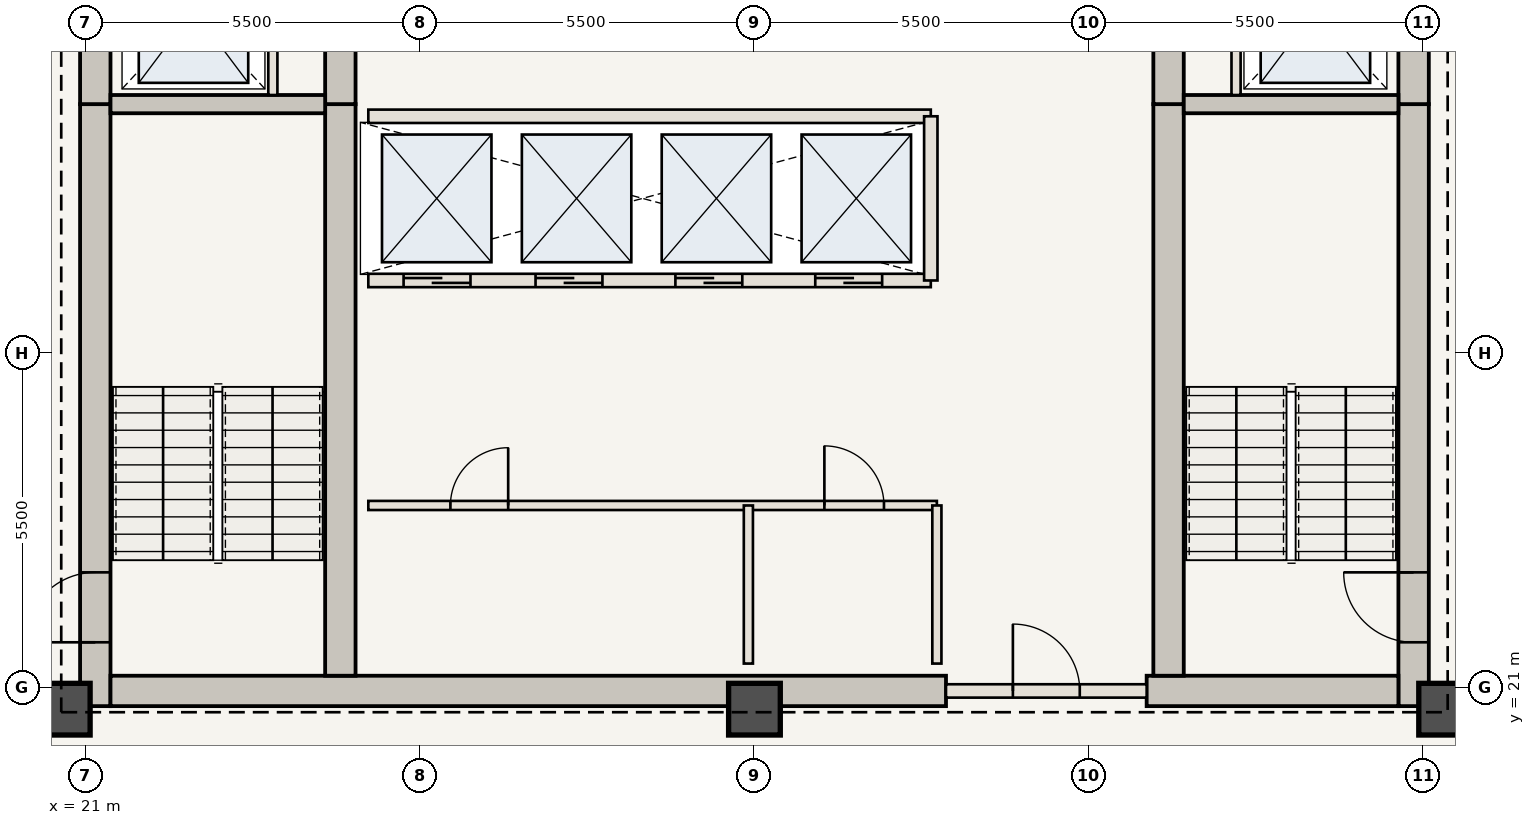
"""IFC4 building model, lengths in metres.
Left out: names, types, materials, properties, quantities, classifications, styles, units other than length and angle.
Written with IfcOpenShell. Run it as: python <this file> out.ifc"""

import sys

from ifc_helpers import new_model, si_unit, direction, frame, frame_2d, origin, origin_2d, place, context, subcontext, project, spatial, rectangle, extrude, element, fill, save


model = new_model("IFC4")
c1 = context("Model", 3, precision=1e-05, world=origin(), true_north=direction((0.0, 1.0)))
c2 = subcontext(c1, "Body", "Model", "MODEL_VIEW")
j1 = project(units=[si_unit("LENGTHUNIT", "METRE"), si_unit("PLANEANGLEUNIT", "RADIAN")], contexts=[c1])
p1 = place(None, origin())
s1 = spatial("IfcSite", under=j1, at=p1, CompositionType="ELEMENT")
p2 = place(p1, origin())
s2 = spatial("IfcBuilding", under=s1, at=p2, CompositionType="ELEMENT")
p3 = place(p2, frame((0.0, 0.0, 217.7)))
s3 = spatial("IfcBuildingStorey", under=s2, at=p3, CompositionType="ELEMENT", Elevation=217.7)
p4 = place(p3, frame((21.16, 20.7, 0.0), z_axis=(0.0, 0.0, 1.0), x_axis=(0.0, 1.0, 0.0)))
e1 = element("IfcWall", 1, at=p4, inside=s3, PredefinedType="SHEAR", context=c2, shape_type="SweptSolid", body=[
    extrude(rectangle(XDim=9.9, YDim=0.5, at=frame_2d((4.95, 0.0))), origin(), (0.0, 0.0, 1.0), 3.85),
])
p5 = place(p4, frame((1.05, 0.0, 0.0)))
e2 = element("IfcOpeningElement", 2, at=p5, cuts=e1, PredefinedType="OPENING", context=c2, shape_type="SweptSolid", body=[
    extrude(rectangle(XDim=1.15, YDim=2.15, at=frame_2d((0.575, 1.075))), frame((0.0, 0.26, 0.0), z_axis=(0.0, -1.0, 0.0), x_axis=(1.0, 0.0, 0.0)), (0.0, 0.0, 1.0), 0.52),
])
p6 = place(p3, frame((21.16, 30.6, 0.0), z_axis=(0.0, 0.0, 1.0), x_axis=(0.0, 1.0, 0.0)))
e3 = element("IfcWall", 3, at=p6, inside=s3, PredefinedType="SHEAR", context=c2, shape_type="SweptSolid", body=[
    extrude(rectangle(XDim=12.65, YDim=0.5, at=frame_2d((6.325, 0.0))), origin(), (0.0, 0.0, 1.0), 3.85),
])
p7 = place(p6, frame((4.2, 0.0, 0.0)))
e4 = element("IfcOpeningElement", 4, at=p7, cuts=e3, PredefinedType="OPENING", context=c2, shape_type="SweptSolid", body=[
    extrude(rectangle(XDim=1.1, YDim=2.15, at=frame_2d((0.55, 1.075))), frame((0.0, 0.26, 0.0), z_axis=(0.0, -1.0, 0.0), x_axis=(1.0, 0.0, 0.0)), (0.0, 0.0, 1.0), 0.52),
])
p8 = place(p6, frame((8.05, 0.0, 0.0)))
e5 = element("IfcOpeningElement", 5, at=p8, cuts=e3, PredefinedType="OPENING", context=c2, shape_type="SweptSolid", body=[
    extrude(rectangle(XDim=0.92, YDim=2.1, at=frame_2d((0.46, 1.05))), frame((0.0, 0.26, 0.0), z_axis=(0.0, -1.0, 0.0), x_axis=(1.0, 0.0, 0.0)), (0.0, 0.0, 1.0), 0.52),
])
p9 = place(p6, frame((9.45, 0.0, 0.0)))
e6 = element("IfcOpeningElement", 6, at=p9, cuts=e3, PredefinedType="OPENING", context=c2, shape_type="SweptSolid", body=[
    extrude(rectangle(XDim=0.88, YDim=2.1, at=frame_2d((0.44, 1.05))), frame((0.0, 0.26, 0.0), z_axis=(0.0, -1.0, 0.0), x_axis=(1.0, 0.0, 0.0)), (0.0, 0.0, 1.0), 0.52),
])
p10 = place(p6, frame((10.85, 0.0, 0.0)))
e7 = element("IfcOpeningElement", 7, at=p10, cuts=e3, PredefinedType="OPENING", context=c2, shape_type="SweptSolid", body=[
    extrude(rectangle(XDim=0.88, YDim=2.1, at=frame_2d((0.44, 1.05))), frame((0.0, 0.26, 0.0), z_axis=(0.0, -1.0, 0.0), x_axis=(1.0, 0.0, 0.0)), (0.0, 0.0, 1.0), 0.52),
])
p11 = place(p3, frame((42.84, 20.7, 0.0), z_axis=(0.0, 0.0, 1.0), x_axis=(0.0, 1.0, 0.0)))
e8 = element("IfcWall", 8, at=p11, inside=s3, PredefinedType="SHEAR", context=c2, shape_type="SweptSolid", body=[
    extrude(rectangle(XDim=9.9, YDim=0.5, at=frame_2d((4.95, 0.0))), origin(), (0.0, 0.0, 1.0), 3.85),
])
p12 = place(p11, frame((1.05, 0.0, 0.0)))
e9 = element("IfcOpeningElement", 9, at=p12, cuts=e8, PredefinedType="OPENING", context=c2, shape_type="SweptSolid", body=[
    extrude(rectangle(XDim=1.15, YDim=2.15, at=frame_2d((0.575, 1.075))), frame((0.0, 0.26, 0.0), z_axis=(0.0, -1.0, 0.0), x_axis=(1.0, 0.0, 0.0)), (0.0, 0.0, 1.0), 0.52),
])
p13 = place(p3, frame((42.84, 30.6, 0.0), z_axis=(0.0, 0.0, 1.0), x_axis=(0.0, 1.0, 0.0)))
e10 = element("IfcWall", 10, at=p13, inside=s3, PredefinedType="SHEAR", context=c2, shape_type="SweptSolid", body=[
    extrude(rectangle(XDim=12.65, YDim=0.5, at=frame_2d((6.325, 0.0))), origin(), (0.0, 0.0, 1.0), 3.85),
])
p14 = place(p13, frame((4.2, 0.0, 0.0)))
e11 = element("IfcOpeningElement", 11, at=p14, cuts=e10, PredefinedType="OPENING", context=c2, shape_type="SweptSolid", body=[
    extrude(rectangle(XDim=1.1, YDim=2.15, at=frame_2d((0.55, 1.075))), frame((0.0, 0.26, 0.0), z_axis=(0.0, -1.0, 0.0), x_axis=(1.0, 0.0, 0.0)), (0.0, 0.0, 1.0), 0.52),
])
p15 = place(p13, frame((9.2, 0.0, 0.0)))
e12 = element("IfcOpeningElement", 12, at=p15, cuts=e10, PredefinedType="OPENING", context=c2, shape_type="SweptSolid", body=[
    extrude(rectangle(XDim=0.92, YDim=2.1, at=frame_2d((0.46, 1.05))), frame((0.0, 0.26, 0.0), z_axis=(0.0, -1.0, 0.0), x_axis=(1.0, 0.0, 0.0)), (0.0, 0.0, 1.0), 0.52),
])
p16 = place(p3, frame((21.41, 20.95, 0.0), z_axis=(0.0, 0.0, 1.0), x_axis=(1.0, 0.0, 0.0)))
e13 = element("IfcWall", 13, at=p16, inside=s3, PredefinedType="SHEAR", context=c2, shape_type="SweptSolid", body=[
    extrude(rectangle(XDim=13.74, YDim=0.5, at=frame_2d((6.87, 0.0))), origin(), (0.0, 0.0, 1.0), 3.85),
])
p17 = place(p3, frame((38.45, 20.95, 0.0), z_axis=(0.0, 0.0, 1.0), x_axis=(1.0, 0.0, 0.0)))
e14 = element("IfcWall", 14, at=p17, inside=s3, PredefinedType="SHEAR", context=c2, shape_type="SweptSolid", body=[
    extrude(rectangle(XDim=4.14, YDim=0.5, at=frame_2d((2.07, 0.0))), origin(), (0.0, 0.0, 1.0), 3.85),
])
p18 = place(p3, frame((25.19, 21.2, 0.0), z_axis=(0.0, 0.0, 1.0), x_axis=(0.0, 1.0, 0.0)))
e15 = element("IfcWall", 15, at=p18, inside=s3, PredefinedType="SHEAR", context=c2, shape_type="SweptSolid", body=[
    extrude(rectangle(XDim=9.4, YDim=0.5, at=frame_2d((4.7, 0.0))), origin(), (0.0, 0.0, 1.0), 3.85),
])
p19 = place(p3, frame((25.19, 30.6, 0.0), z_axis=(0.0, 0.0, 1.0), x_axis=(0.0, 1.0, 0.0)))
e16 = element("IfcWall", 16, at=p19, inside=s3, PredefinedType="SHEAR", context=c2, shape_type="SweptSolid", body=[
    extrude(rectangle(XDim=12.15, YDim=0.5, at=frame_2d((6.075, 0.0))), origin(), (0.0, 0.0, 1.0), 3.85),
])
p20 = place(p19, frame((6.25, 0.0, 0.0)))
e17 = element("IfcOpeningElement", 17, at=p20, cuts=e16, PredefinedType="OPENING", context=c2, shape_type="SweptSolid", body=[
    extrude(rectangle(XDim=1.1, YDim=2.15, at=frame_2d((0.55, 1.075))), frame((0.0, 0.26, 0.0), z_axis=(0.0, -1.0, 0.0), x_axis=(1.0, 0.0, 0.0)), (0.0, 0.0, 1.0), 0.52),
])
p21 = place(p3, frame((38.81, 21.2, 0.0), z_axis=(0.0, 0.0, 1.0), x_axis=(0.0, 1.0, 0.0)))
e18 = element("IfcWall", 18, at=p21, inside=s3, PredefinedType="SHEAR", context=c2, shape_type="SweptSolid", body=[
    extrude(rectangle(XDim=9.4, YDim=0.5, at=frame_2d((4.7, 0.0))), origin(), (0.0, 0.0, 1.0), 3.85),
])
p22 = place(p3, frame((38.81, 30.6, 0.0), z_axis=(0.0, 0.0, 1.0), x_axis=(0.0, 1.0, 0.0)))
e19 = element("IfcWall", 19, at=p22, inside=s3, PredefinedType="SHEAR", context=c2, shape_type="SweptSolid", body=[
    extrude(rectangle(XDim=12.15, YDim=0.5, at=frame_2d((6.075, 0.0))), origin(), (0.0, 0.0, 1.0), 3.85),
])
for number, where, z_axis, x_axis in (
    (20, (20.65, 20.65, 0.0), (0.0, 0.0, 1.0), (1.0, 0.0, 0.0)),
    (21, (32.0, 20.65, 0.0), (0.0, 0.0, 1.0), (1.0, 0.0, 0.0)),
    (22, (43.35, 20.65, 0.0), (0.0, 0.0, 1.0), (1.0, 0.0, 0.0)),
):
    element("IfcColumn", number, at=place(p3, frame(where, z_axis=z_axis, x_axis=x_axis)), inside=s3, PredefinedType="COLUMN", context=c2, shape_type="SweptSolid", body=[
        extrude(rectangle(XDim=0.85, YDim=0.85, at=origin_2d()), origin(), (0.0, 0.0, 1.0), 3.85),
    ])
for number, where, z_axis, x_axis in (
    (23, (21.41, 30.6, 0.0), (0.0, 0.0, 1.0), (1.0, 0.0, 0.0)),
    (24, (39.06, 30.6, 0.0), (0.0, 0.0, 1.0), (1.0, 0.0, 0.0)),
):
    element("IfcWall", number, at=place(p3, frame(where, z_axis=z_axis, x_axis=x_axis)), inside=s3, PredefinedType="SHEAR", context=c2, shape_type="SweptSolid", body=[
        extrude(rectangle(XDim=3.53, YDim=0.3, at=frame_2d((1.765, 0.0))), origin(), (0.0, 0.0, 1.0), 3.685),
    ])
for number, where, z_axis, x_axis in (
    (25, (24.08, 30.75, 0.0), (0.0, 0.0, 1.0), (0.0, 1.0, 0.0)),
    (26, (39.92, 30.75, 0.0), (0.0, 0.0, 1.0), (0.0, 1.0, 0.0)),
):
    element("IfcWall", number, at=place(p3, frame(where, z_axis=z_axis, x_axis=x_axis)), inside=s3, PredefinedType="STANDARD", context=c2, shape_type="SweptSolid", body=[
        extrude(rectangle(XDim=2.65, YDim=0.15, at=frame_2d((1.325, 0.0))), origin(), (0.0, 0.0, 1.0), 3.685),
    ])
p23 = place(p3, frame((35.15, 20.95, 0.0), z_axis=(0.0, 0.0, 1.0), x_axis=(1.0, 0.0, 0.0)))
e27 = element("IfcWall", 27, at=p23, inside=s3, PredefinedType="STANDARD", context=c2, shape_type="SweptSolid", body=[
    extrude(rectangle(XDim=3.3, YDim=0.22, at=frame_2d((1.65, 0.0))), origin(), (0.0, 0.0, 1.0), 3.685),
])
p24 = place(p23, frame((1.1, 0.0, 0.0)))
e28 = element("IfcOpeningElement", 28, at=p24, cuts=e27, PredefinedType="OPENING", context=c2, shape_type="SweptSolid", body=[
    extrude(rectangle(XDim=1.1, YDim=2.15, at=frame_2d((0.55, 1.075))), frame((0.0, 0.12, 0.0), z_axis=(0.0, -1.0, 0.0), x_axis=(1.0, 0.0, 0.0)), (0.0, 0.0, 1.0), 0.24),
])
p25 = place(p3, frame((25.65, 24.0, 0.0), z_axis=(0.0, 0.0, 1.0), x_axis=(1.0, 0.0, 0.0)))
e29 = element("IfcWall", 29, at=p25, inside=s3, PredefinedType="STANDARD", context=c2, shape_type="SweptSolid", body=[
    extrude(rectangle(XDim=9.35, YDim=0.15, at=frame_2d((4.675, 0.0))), origin(), (0.0, 0.0, 1.0), 3.685),
])
p26 = place(p25, frame((1.35, 0.0, 0.0)))
e30 = element("IfcOpeningElement", 30, at=p26, cuts=e29, PredefinedType="OPENING", context=c2, shape_type="SweptSolid", body=[
    extrude(rectangle(XDim=0.95, YDim=2.15, at=frame_2d((0.475, 1.075))), frame((0.0, 0.085, 0.0), z_axis=(0.0, -1.0, 0.0), x_axis=(1.0, 0.0, 0.0)), (0.0, 0.0, 1.0), 0.17),
])
p27 = place(p25, frame((7.5, 0.0, 0.0)))
e31 = element("IfcOpeningElement", 31, at=p27, cuts=e29, PredefinedType="OPENING", context=c2, shape_type="SweptSolid", body=[
    extrude(rectangle(XDim=0.98, YDim=2.2, at=frame_2d((0.49, 1.1))), frame((0.0, 0.085, 0.0), z_axis=(0.0, -1.0, 0.0), x_axis=(1.0, 0.0, 0.0)), (0.0, 0.0, 1.0), 0.17),
])
for number, where, z_axis, x_axis in (
    (32, (31.9, 21.4, 0.0), (0.0, 0.0, 1.0), (0.0, 1.0, 0.0)),
    (33, (35.0, 21.4, 0.0), (0.0, 0.0, 1.0), (0.0, 1.0, 0.0)),
):
    element("IfcWall", number, at=place(p3, frame(where, z_axis=z_axis, x_axis=x_axis)), inside=s3, PredefinedType="STANDARD", context=c2, shape_type="SweptSolid", body=[
        extrude(rectangle(XDim=2.6, YDim=0.15, at=frame_2d((1.3, 0.0))), origin(), (0.0, 0.0, 1.0), 3.685),
    ])
p28 = place(p3, frame((25.65, 27.7, 0.0), z_axis=(0.0, 0.0, 1.0), x_axis=(1.0, 0.0, 0.0)))
e34 = element("IfcWall", 34, at=p28, inside=s3, PredefinedType="STANDARD", context=c2, shape_type="SweptSolid", body=[
    extrude(rectangle(XDim=9.25, YDim=0.22, at=frame_2d((4.625, 0.0))), origin(), (0.0, 0.0, 1.0), 3.685),
])
p29 = place(p28, frame((0.58, 0.0, 0.0)))
e35 = element("IfcOpeningElement", 35, at=p29, cuts=e34, PredefinedType="OPENING", context=c2, shape_type="SweptSolid", body=[
    extrude(rectangle(XDim=1.1, YDim=2.15, at=frame_2d((0.55, 1.075))), frame((0.0, 0.12, 0.0), z_axis=(0.0, -1.0, 0.0), x_axis=(1.0, 0.0, 0.0)), (0.0, 0.0, 1.0), 0.24),
])
p30 = place(p28, frame((2.75, 0.0, 0.0)))
e36 = element("IfcOpeningElement", 36, at=p30, cuts=e34, PredefinedType="OPENING", context=c2, shape_type="SweptSolid", body=[
    extrude(rectangle(XDim=1.1, YDim=2.15, at=frame_2d((0.55, 1.075))), frame((0.0, 0.12, 0.0), z_axis=(0.0, -1.0, 0.0), x_axis=(1.0, 0.0, 0.0)), (0.0, 0.0, 1.0), 0.24),
])
p31 = place(p28, frame((5.05, 0.0, 0.0)))
e37 = element("IfcOpeningElement", 37, at=p31, cuts=e34, PredefinedType="OPENING", context=c2, shape_type="SweptSolid", body=[
    extrude(rectangle(XDim=1.1, YDim=2.15, at=frame_2d((0.55, 1.075))), frame((0.0, 0.12, 0.0), z_axis=(0.0, -1.0, 0.0), x_axis=(1.0, 0.0, 0.0)), (0.0, 0.0, 1.0), 0.24),
])
p32 = place(p28, frame((7.35, 0.0, 0.0)))
e38 = element("IfcOpeningElement", 38, at=p32, cuts=e34, PredefinedType="OPENING", context=c2, shape_type="SweptSolid", body=[
    extrude(rectangle(XDim=1.1, YDim=2.15, at=frame_2d((0.55, 1.075))), frame((0.0, 0.12, 0.0), z_axis=(0.0, -1.0, 0.0), x_axis=(1.0, 0.0, 0.0)), (0.0, 0.0, 1.0), 0.24),
])
p33 = place(p3, frame((25.65, 30.4, 0.0), z_axis=(0.0, 0.0, 1.0), x_axis=(1.0, 0.0, 0.0)))
e39 = element("IfcWall", 39, at=p33, inside=s3, PredefinedType="STANDARD", context=c2, shape_type="SweptSolid", body=[
    extrude(rectangle(XDim=9.25, YDim=0.22, at=frame_2d((4.625, 0.0))), origin(), (0.0, 0.0, 1.0), 3.685),
])
p34 = place(p3, frame((34.9, 27.7, 0.0), z_axis=(0.0, 0.0, 1.0), x_axis=(0.0, 1.0, 0.0)))
e40 = element("IfcWall", 40, at=p34, inside=s3, PredefinedType="STANDARD", context=c2, shape_type="SweptSolid", body=[
    extrude(rectangle(XDim=2.7, YDim=0.22, at=frame_2d((1.35, 0.0))), origin(), (0.0, 0.0, 1.0), 3.685),
])
p35 = place(p5, origin())
e41 = element("IfcDoor", 41, at=p35, inside=s3, OperationType="SINGLE_SWING_LEFT", PredefinedType="DOOR", context=c2, shape_type="SweptSolid", body=[
    extrude(rectangle(XDim=1.15, YDim=2.15, at=frame_2d((0.575, 1.075))), frame((0.0, 0.025, 0.0), z_axis=(0.0, -1.0, 0.0), x_axis=(1.0, 0.0, 0.0)), (0.0, 0.0, 1.0), 0.05),
])
fill(e2, e41)
p36 = place(p12, origin())
e42 = element("IfcDoor", 42, at=p36, inside=s3, OperationType="SINGLE_SWING_RIGHT", PredefinedType="DOOR", context=c2, shape_type="SweptSolid", body=[
    extrude(rectangle(XDim=1.15, YDim=2.15, at=frame_2d((0.575, 1.075))), frame((0.0, 0.025, 0.0), z_axis=(0.0, -1.0, 0.0), x_axis=(1.0, 0.0, 0.0)), (0.0, 0.0, 1.0), 0.05),
])
fill(e9, e42)
p37 = place(p24, origin())
e43 = element("IfcDoor", 43, at=p37, inside=s3, OperationType="SINGLE_SWING_LEFT", PredefinedType="DOOR", context=c2, shape_type="SweptSolid", body=[
    extrude(rectangle(XDim=1.1, YDim=2.15, at=frame_2d((0.55, 1.075))), frame((0.0, 0.025, 0.0), z_axis=(0.0, -1.0, 0.0), x_axis=(1.0, 0.0, 0.0)), (0.0, 0.0, 1.0), 0.05),
])
fill(e28, e43)
p38 = place(p26, origin())
e44 = element("IfcDoor", 44, at=p38, inside=s3, OperationType="SINGLE_SWING_RIGHT", PredefinedType="DOOR", context=c2, shape_type="SweptSolid", body=[
    extrude(rectangle(XDim=0.95, YDim=2.15, at=frame_2d((0.475, 1.075))), frame((0.0, 0.025, 0.0), z_axis=(0.0, -1.0, 0.0), x_axis=(1.0, 0.0, 0.0)), (0.0, 0.0, 1.0), 0.05),
])
fill(e30, e44)
p39 = place(p27, origin())
e45 = element("IfcDoor", 45, at=p39, inside=s3, OperationType="SINGLE_SWING_LEFT", PredefinedType="DOOR", context=c2, shape_type="SweptSolid", body=[
    extrude(rectangle(XDim=0.98, YDim=2.2, at=frame_2d((0.49, 1.1))), frame((0.0, 0.025, 0.0), z_axis=(0.0, -1.0, 0.0), x_axis=(1.0, 0.0, 0.0)), (0.0, 0.0, 1.0), 0.05),
])
fill(e31, e45)
p40 = place(p29, origin())
e46 = element("IfcDoor", 46, at=p40, inside=s3, OperationType="DOUBLE_DOOR_SLIDING", PredefinedType="DOOR", context=c2, shape_type="SweptSolid", body=[
    extrude(rectangle(XDim=1.1, YDim=2.15, at=frame_2d((0.55, 1.075))), frame((0.0, 0.025, 0.0), z_axis=(0.0, -1.0, 0.0), x_axis=(1.0, 0.0, 0.0)), (0.0, 0.0, 1.0), 0.05),
])
fill(e35, e46)
p41 = place(p30, origin())
e47 = element("IfcDoor", 47, at=p41, inside=s3, OperationType="DOUBLE_DOOR_SLIDING", PredefinedType="DOOR", context=c2, shape_type="SweptSolid", body=[
    extrude(rectangle(XDim=1.1, YDim=2.15, at=frame_2d((0.55, 1.075))), frame((0.0, 0.025, 0.0), z_axis=(0.0, -1.0, 0.0), x_axis=(1.0, 0.0, 0.0)), (0.0, 0.0, 1.0), 0.05),
])
fill(e36, e47)
p42 = place(p31, origin())
e48 = element("IfcDoor", 48, at=p42, inside=s3, OperationType="DOUBLE_DOOR_SLIDING", PredefinedType="DOOR", context=c2, shape_type="SweptSolid", body=[
    extrude(rectangle(XDim=1.1, YDim=2.15, at=frame_2d((0.55, 1.075))), frame((0.0, 0.025, 0.0), z_axis=(0.0, -1.0, 0.0), x_axis=(1.0, 0.0, 0.0)), (0.0, 0.0, 1.0), 0.05),
])
fill(e37, e48)
p43 = place(p32, origin())
e49 = element("IfcDoor", 49, at=p43, inside=s3, OperationType="DOUBLE_DOOR_SLIDING", PredefinedType="DOOR", context=c2, shape_type="SweptSolid", body=[
    extrude(rectangle(XDim=1.1, YDim=2.15, at=frame_2d((0.55, 1.075))), frame((0.0, 0.025, 0.0), z_axis=(0.0, -1.0, 0.0), x_axis=(1.0, 0.0, 0.0)), (0.0, 0.0, 1.0), 0.05),
])
fill(e38, e49)
save(model, sys.argv[1])
